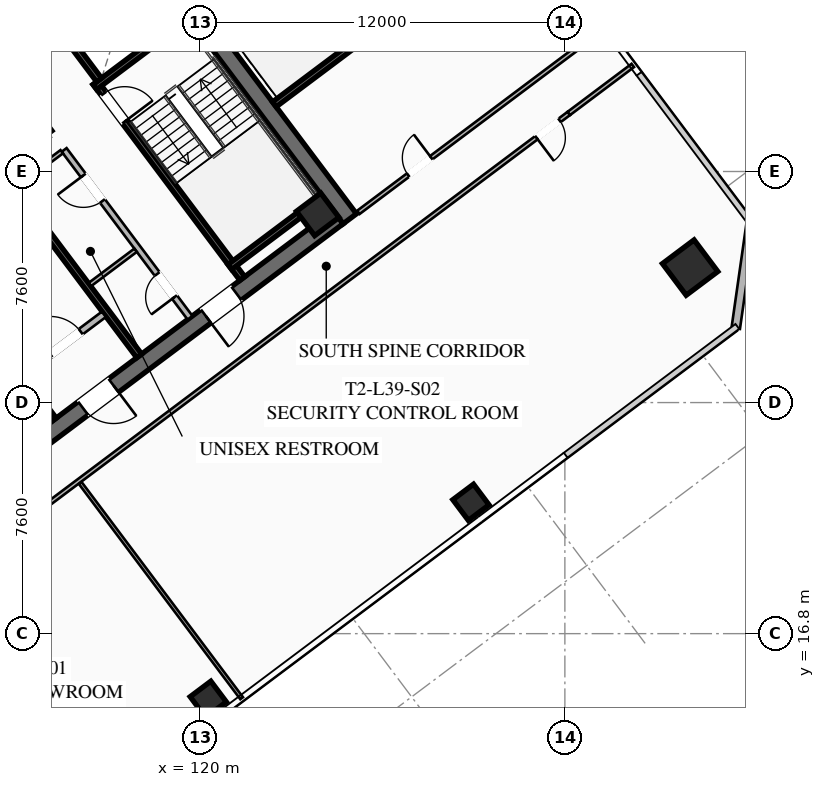
"""IFC4 building model, lengths in metres.
Left out: names, types, materials, properties, quantities, classifications, styles, units other than length and angle.
Written with IfcOpenShell. Run it as: python <this file> out.ifc"""

import sys

from ifc_helpers import new_model, si_unit, direction, frame, frame_2d, origin, origin_2d, place, context, subcontext, project, spatial, rectangle, hollow_rectangle, extrude, element, fill, save


model = new_model("IFC4")
c1 = context("Model", 3, precision=1e-05, world=origin(), true_north=direction((0.0, 1.0)))
c2 = subcontext(c1, "Body", "Model", "MODEL_VIEW")
j1 = project(units=[si_unit("LENGTHUNIT", "METRE"), si_unit("PLANEANGLEUNIT", "RADIAN")], contexts=[c1])
p1 = place(None, origin())
s1 = spatial("IfcSite", under=j1, at=p1, CompositionType="ELEMENT")
p2 = place(p1, origin())
s2 = spatial("IfcBuilding", under=s1, at=p2, CompositionType="ELEMENT")
p3 = place(p2, frame((0.0, 0.0, 146.35)))
s3 = spatial("IfcBuildingStorey", under=s2, at=p3, CompositionType="ELEMENT", Elevation=146.35)
p4 = place(p3, frame((115.564, 42.923, 0.0), z_axis=(0.0, 0.0, 1.0), x_axis=(0.600005007985, -0.799996243986, 0.0)))
e1 = element("IfcWall", 1, at=p4, inside=s3, PredefinedType="SHEAR", context=c2, shape_type="SweptSolid", body=[
    extrude(rectangle(XDim=15.6, YDim=0.55, at=frame_2d((7.8, 0.0))), origin(), (0.0, 0.0, 1.0), 3.55),
])
p5 = place(p3, frame((124.539, 30.498, 0.0), z_axis=(0.0, 0.0, 1.0), x_axis=(-0.799998054672, -0.600002593761, 0.0)))
e2 = element("IfcWall", 2, at=p5, inside=s3, PredefinedType="SHEAR", context=c2, shape_type="SweptSolid", body=[
    extrude(rectangle(XDim=15.06, YDim=0.55, at=frame_2d((7.53, 0.0))), origin(), (0.0, 0.0, 1.0), 3.55),
])
p6 = place(p5, frame((9.23, 0.0, 0.0)))
e3 = element("IfcOpeningElement", 3, at=p6, cuts=e2, PredefinedType="OPENING", context=c2, shape_type="SweptSolid", body=[
    extrude(rectangle(XDim=1.25, YDim=2.25, at=frame_2d((0.625, 1.125))), frame((0.0, 0.285, 0.0), z_axis=(0.0, -1.0, 0.0), x_axis=(1.0, 0.0, 0.0)), (0.0, 0.0, 1.0), 0.57),
])
p7 = place(p5, frame((4.18, 0.0, 0.0)))
e4 = element("IfcOpeningElement", 4, at=p7, cuts=e2, PredefinedType="OPENING", context=c2, shape_type="SweptSolid", body=[
    extrude(rectangle(XDim=1.25, YDim=2.25, at=frame_2d((0.625, 1.125))), frame((0.0, 0.285, 0.0), z_axis=(0.0, -1.0, 0.0), x_axis=(1.0, 0.0, 0.0)), (0.0, 0.0, 1.0), 0.57),
])
p8 = place(p3, frame((103.461, 33.502, 0.0), z_axis=(0.0, 0.0, 1.0), x_axis=(0.799998054672, 0.600002593761, 0.0)))
e5 = element("IfcWall", 5, at=p8, inside=s3, PredefinedType="SHEAR", context=c2, shape_type="SweptSolid", body=[
    extrude(rectangle(XDim=15.06, YDim=0.55, at=frame_2d((7.53, 0.0))), origin(), (0.0, 0.0, 1.0), 3.55),
])
p9 = place(p8, frame((4.58, 0.0, 0.0)))
e6 = element("IfcOpeningElement", 6, at=p9, cuts=e5, PredefinedType="OPENING", context=c2, shape_type="SweptSolid", body=[
    extrude(rectangle(XDim=1.25, YDim=2.25, at=frame_2d((0.625, 1.125))), frame((0.0, 0.285, 0.0), z_axis=(0.0, -1.0, 0.0), x_axis=(1.0, 0.0, 0.0)), (0.0, 0.0, 1.0), 0.57),
])
p10 = place(p8, frame((9.63, 0.0, 0.0)))
e7 = element("IfcOpeningElement", 7, at=p10, cuts=e5, PredefinedType="OPENING", context=c2, shape_type="SweptSolid", body=[
    extrude(rectangle(XDim=1.25, YDim=2.25, at=frame_2d((0.625, 1.125))), frame((0.0, 0.285, 0.0), z_axis=(0.0, -1.0, 0.0), x_axis=(1.0, 0.0, 0.0)), (0.0, 0.0, 1.0), 0.57),
])
p11 = place(p3, frame((123.87, 30.59, 0.0), z_axis=(0.0, 0.0, 1.0), x_axis=(0.799999996291, 0.600000004945, 0.0)))
e8 = element("IfcColumn", 8, at=p11, inside=s3, PredefinedType="COLUMN", context=c2, shape_type="SweptSolid", body=[
    extrude(hollow_rectangle(XDim=1.0, YDim=1.0, WallThickness=0.04, at=origin_2d()), origin(), (0.0, 0.0, 1.0), 3.37),
])
p12 = place(p3, frame((136.12, 28.84, 0.0), z_axis=(0.0, 0.0, 1.0), x_axis=(0.799999996291, 0.600000004945, 0.0)))
e9 = element("IfcColumn", 9, at=p12, inside=s3, PredefinedType="COLUMN", context=c2, shape_type="SweptSolid", body=[
    extrude(hollow_rectangle(XDim=1.3, YDim=1.3, WallThickness=0.05, at=origin_2d()), origin(), (0.0, 0.0, 1.0), 3.37),
])
for number, where, z_axis, x_axis in (
    (10, (120.27, 14.64, 0.0), (0.0, 0.0, 1.0), (0.8, 0.6, 0.0)),
    (11, (128.91, 21.12, 0.0), (0.0, 0.0, 1.0), (0.8, 0.6, 0.0)),
):
    element("IfcColumn", number, at=place(p3, frame(where, z_axis=z_axis, x_axis=x_axis)), inside=s3, PredefinedType="COLUMN", context=c2, shape_type="SweptSolid", body=[
        extrude(hollow_rectangle(XDim=0.85, YDim=0.85, WallThickness=0.035, at=origin_2d()), origin(), (0.0, 0.0, 1.0), 3.37),
    ])
p13 = place(p3, frame((138.12, 30.34, 0.0), z_axis=(0.0, 0.0, 1.0), x_axis=(-0.141421356237, -0.989949493661, 0.0)))
e12 = element("IfcWall", 12, at=p13, inside=s3, PredefinedType="SOLIDWALL", context=c2, shape_type="SweptSolid", body=[
    extrude(rectangle(XDim=3.536, YDim=0.28, at=frame_2d((1.768, 0.0))), origin(), (0.0, 0.0, 1.0), 3.37),
])
p14 = place(p3, frame((116.56, 34.92, 0.0), z_axis=(0.0, 0.0, 1.0), x_axis=(0.59999029481, -0.8000072788, 0.0)))
e13 = element("IfcWall", 13, at=p14, inside=s3, PredefinedType="SHEAR", context=c2, shape_type="SweptSolid", body=[
    extrude(rectangle(XDim=8.05, YDim=0.2, at=frame_2d((4.025, 0.0))), origin(), (0.0, 0.0, 1.0), 3.37),
])
p15 = place(p14, frame((0.45, 0.0, 0.0)))
e14 = element("IfcOpeningElement", 14, at=p15, cuts=e13, PredefinedType="OPENING", context=c2, shape_type="SweptSolid", body=[
    extrude(rectangle(XDim=1.15, YDim=2.2, at=frame_2d((0.575, 1.1))), frame((0.0, 0.11, 0.0), z_axis=(0.0, -1.0, 0.0), x_axis=(1.0, 0.0, 0.0)), (0.0, 0.0, 1.0), 0.22),
])
for number, where, z_axis, x_axis in (
    (15, (116.54, 34.78, 0.0), (0.0, 0.0, 1.0), (0.8, 0.6, 0.0)),
    (16, (120.98, 28.86, 0.0), (0.0, 0.0, 1.0), (0.8, 0.6, 0.0)),
):
    element("IfcWall", number, at=place(p3, frame(where, z_axis=z_axis, x_axis=x_axis)), inside=s3, PredefinedType="SHEAR", context=c2, shape_type="SweptSolid", body=[
        extrude(rectangle(XDim=3.83, YDim=0.2, at=frame_2d((1.915, 0.0))), origin(), (0.0, 0.0, 1.0), 3.37),
    ])
p16 = place(p3, frame((117.998, 25.936, 0.0), z_axis=(0.0, 0.0, 1.0), x_axis=(-0.600002693989, 0.799997979501, 0.0)))
e17 = element("IfcWall", 17, at=p16, inside=s3, PredefinedType="SHEAR", context=c2, shape_type="SweptSolid", body=[
    extrude(rectangle(XDim=14.5, YDim=0.2, at=frame_2d((7.25, 0.0))), origin(), (0.0, 0.0, 1.0), 3.37),
])
p17 = place(p3, frame((114.316, 25.412, 0.0), z_axis=(0.0, 0.0, 1.0), x_axis=(0.800018601094, 0.59997519774, 0.0)))
e18 = element("IfcWall", 18, at=p17, inside=s3, PredefinedType="SOLIDWALL", context=c2, shape_type="SweptSolid", body=[
    extrude(rectangle(XDim=3.15, YDim=0.22, at=frame_2d((1.575, 0.0))), origin(), (0.0, 0.0, 1.0), 2.723),
])
p18 = place(p17, frame((0.95, 0.0, 0.0)))
e19 = element("IfcOpeningElement", 19, at=p18, cuts=e18, PredefinedType="OPENING", context=c2, shape_type="SweptSolid", body=[
    extrude(rectangle(XDim=1.25, YDim=2.25, at=frame_2d((0.625, 1.125))), frame((0.0, 0.12, 0.0), z_axis=(0.0, -1.0, 0.0), x_axis=(1.0, 0.0, 0.0)), (0.0, 0.0, 1.0), 0.24),
])
p19 = place(p3, frame((115.19, 23.83, 0.0), z_axis=(0.0, 0.0, 1.0), x_axis=(-0.599993943644, 0.800004542231, 0.0)))
e20 = element("IfcWall", 20, at=p19, inside=s3, PredefinedType="SHEAR", context=c2, shape_type="SweptSolid", body=[
    extrude(rectangle(XDim=6.45, YDim=0.2, at=frame_2d((3.225, 0.0))), origin(), (0.0, 0.0, 1.0), 3.37),
])
p20 = place(p19, frame((4.875, 0.0, 0.0)))
e21 = element("IfcOpeningElement", 21, at=p20, cuts=e20, PredefinedType="OPENING", context=c2, shape_type="SweptSolid", body=[
    extrude(rectangle(XDim=1.3, YDim=2.25, at=frame_2d((0.65, 1.125))), frame((0.0, 0.11, 0.0), z_axis=(0.0, -1.0, 0.0), x_axis=(1.0, 0.0, 0.0)), (0.0, 0.0, 1.0), 0.22),
])
p21 = place(p19, frame((2.875, 0.0, 0.0)))
e22 = element("IfcOpeningElement", 22, at=p21, cuts=e20, PredefinedType="OPENING", context=c2, shape_type="SweptSolid", body=[
    extrude(rectangle(XDim=1.3, YDim=2.25, at=frame_2d((0.65, 1.125))), frame((0.0, 0.11, 0.0), z_axis=(0.0, -1.0, 0.0), x_axis=(1.0, 0.0, 0.0)), (0.0, 0.0, 1.0), 0.22),
])
p22 = place(p19, frame((0.675, 0.0, 0.0)))
e23 = element("IfcOpeningElement", 23, at=p22, cuts=e20, PredefinedType="OPENING", context=c2, shape_type="SweptSolid", body=[
    extrude(rectangle(XDim=1.3, YDim=2.25, at=frame_2d((0.65, 1.125))), frame((0.0, 0.11, 0.0), z_axis=(0.0, -1.0, 0.0), x_axis=(1.0, 0.0, 0.0)), (0.0, 0.0, 1.0), 0.22),
])
p23 = place(p3, frame((112.81, 40.17, 0.0), z_axis=(0.0, 0.0, 1.0), x_axis=(0.599993943644, -0.800004542231, 0.0)))
e24 = element("IfcWall", 24, at=p23, inside=s3, PredefinedType="SHEAR", context=c2, shape_type="SweptSolid", body=[
    extrude(rectangle(XDim=6.45, YDim=0.2, at=frame_2d((3.225, 0.0))), origin(), (0.0, 0.0, 1.0), 3.37),
])
p24 = place(p3, frame((119.67, 27.19, 0.0), z_axis=(0.0, 0.0, 1.0), x_axis=(-0.599988677396, 0.800008491828, 0.0)))
e25 = element("IfcWall", 25, at=p24, inside=s3, PredefinedType="SOLIDWALL", context=c2, shape_type="SweptSolid", body=[
    extrude(rectangle(XDim=6.9, YDim=0.2, at=frame_2d((3.45, 0.0))), origin(), (0.0, 0.0, 1.0), 2.723),
])
p25 = place(p24, frame((0.85, 0.0, 0.0)))
e26 = element("IfcOpeningElement", 26, at=p25, cuts=e25, PredefinedType="OPENING", context=c2, shape_type="SweptSolid", body=[
    extrude(rectangle(XDim=0.95, YDim=2.05, at=frame_2d((0.475, 1.025))), frame((0.0, 0.11, 0.0), z_axis=(0.0, -1.0, 0.0), x_axis=(1.0, 0.0, 0.0)), (0.0, 0.0, 1.0), 0.22),
])
p26 = place(p24, frame((4.8, 0.0, 0.0)))
e27 = element("IfcOpeningElement", 27, at=p26, cuts=e25, PredefinedType="OPENING", context=c2, shape_type="SweptSolid", body=[
    extrude(rectangle(XDim=1.05, YDim=2.2, at=frame_2d((0.525, 1.1))), frame((0.0, 0.11, 0.0), z_axis=(0.0, -1.0, 0.0), x_axis=(1.0, 0.0, 0.0)), (0.0, 0.0, 1.0), 0.22),
])
for number, where, z_axis, x_axis in (
    (28, (113.946, 31.522, 0.0), (0.0, 0.0, 1.0), (0.8, 0.6, 0.0)),
    (29, (116.376, 28.282, 0.0), (0.0, 0.0, 1.0), (0.8, 0.6, 0.0)),
):
    element("IfcWall", number, at=place(p3, frame(where, z_axis=z_axis, x_axis=x_axis)), inside=s3, PredefinedType="PARTITIONING", context=c2, shape_type="SweptSolid", body=[
        extrude(rectangle(XDim=1.88, YDim=0.135, at=frame_2d((0.94, 0.0))), origin(), (0.0, 0.0, 1.0), 2.723),
    ])
p27 = place(p3, frame((115.11, 33.27, 0.0), z_axis=(0.0, 0.0, 1.0), x_axis=(-0.600011322243, 0.799991508192, 0.0)))
e30 = element("IfcWall", 30, at=p27, inside=s3, PredefinedType="SOLIDWALL", context=c2, shape_type="SweptSolid", body=[
    extrude(rectangle(XDim=6.9, YDim=0.2, at=frame_2d((3.45, 0.0))), origin(), (0.0, 0.0, 1.0), 3.37),
])
p28 = place(p27, frame((0.575, 0.0, 0.0)))
e31 = element("IfcOpeningElement", 31, at=p28, cuts=e30, PredefinedType="OPENING", context=c2, shape_type="SweptSolid", body=[
    extrude(rectangle(XDim=1.1, YDim=2.2, at=frame_2d((0.55, 1.1))), frame((0.0, 0.11, 0.0), z_axis=(0.0, -1.0, 0.0), x_axis=(1.0, 0.0, 0.0)), (0.0, 0.0, 1.0), 0.22),
])
p29 = place(p27, frame((2.825, 0.0, 0.0)))
e32 = element("IfcOpeningElement", 32, at=p29, cuts=e30, PredefinedType="OPENING", context=c2, shape_type="SweptSolid", body=[
    extrude(rectangle(XDim=1.1, YDim=2.2, at=frame_2d((0.55, 1.1))), frame((0.0, 0.11, 0.0), z_axis=(0.0, -1.0, 0.0), x_axis=(1.0, 0.0, 0.0)), (0.0, 0.0, 1.0), 0.22),
])
p30 = place(p27, frame((5.075, 0.0, 0.0)))
e33 = element("IfcOpeningElement", 33, at=p30, cuts=e30, PredefinedType="OPENING", context=c2, shape_type="SweptSolid", body=[
    extrude(rectangle(XDim=1.1, YDim=2.2, at=frame_2d((0.55, 1.1))), frame((0.0, 0.11, 0.0), z_axis=(0.0, -1.0, 0.0), x_axis=(1.0, 0.0, 0.0)), (0.0, 0.0, 1.0), 0.22),
])
p31 = place(p3, frame((122.444, 34.208, 0.0), z_axis=(0.0, 0.0, 1.0), x_axis=(0.79999138319, 0.600011488909, 0.0)))
e34 = element("IfcWall", 34, at=p31, inside=s3, PredefinedType="SHEAR", context=c2, shape_type="SweptSolid", body=[
    extrude(rectangle(XDim=3.4, YDim=0.2, at=frame_2d((1.7, 0.0))), origin(), (0.0, 0.0, 1.0), 3.37),
])
p32 = place(p3, frame((94.778, 31.546, 0.0), z_axis=(0.0, 0.0, 1.0), x_axis=(0.8, 0.6, 0.0)))
e35 = element("IfcWall", 35, at=p32, inside=s3, PredefinedType="PARTITIONING", context=c2, shape_type="SweptSolid", body=[
    extrude(rectangle(XDim=31.3, YDim=0.135, at=frame_2d((15.65, 0.0))), origin(), (0.0, 0.0, 1.0), 2.723),
])
p33 = place(p32, frame((0.3, 0.0, 0.0)))
e36 = element("IfcOpeningElement", 36, at=p33, cuts=e35, PredefinedType="OPENING", context=c2, shape_type="SweptSolid", body=[
    extrude(rectangle(XDim=0.95, YDim=2.05, at=frame_2d((0.475, 1.025))), frame((0.0, 0.077, 0.0), z_axis=(0.0, -1.0, 0.0), x_axis=(1.0, 0.0, 0.0)), (0.0, 0.0, 1.0), 0.155),
])
p34 = place(p32, frame((11.21, 0.0, 0.0)))
e37 = element("IfcOpeningElement", 37, at=p34, cuts=e35, PredefinedType="OPENING", context=c2, shape_type="SweptSolid", body=[
    extrude(rectangle(XDim=0.95, YDim=2.05, at=frame_2d((0.475, 1.025))), frame((0.0, 0.077, 0.0), z_axis=(0.0, -1.0, 0.0), x_axis=(1.0, 0.0, 0.0)), (0.0, 0.0, 1.0), 0.155),
])
p35 = place(p32, frame((15.487, 0.0, 0.0)))
e38 = element("IfcOpeningElement", 38, at=p35, cuts=e35, PredefinedType="OPENING", context=c2, shape_type="SweptSolid", body=[
    extrude(rectangle(XDim=0.95, YDim=2.05, at=frame_2d((0.475, 1.025))), frame((0.0, 0.077, 0.0), z_axis=(0.0, -1.0, 0.0), x_axis=(1.0, 0.0, 0.0)), (0.0, 0.0, 1.0), 0.155),
])
p36 = place(p32, frame((30.05, 0.0, 0.0)))
e39 = element("IfcOpeningElement", 39, at=p36, cuts=e35, PredefinedType="OPENING", context=c2, shape_type="SweptSolid", body=[
    extrude(rectangle(XDim=0.95, YDim=2.05, at=frame_2d((0.475, 1.025))), frame((0.0, 0.077, 0.0), z_axis=(0.0, -1.0, 0.0), x_axis=(1.0, 0.0, 0.0)), (0.0, 0.0, 1.0), 0.155),
])
p37 = place(p3, frame((132.13, 33.91, 0.0), z_axis=(0.0, 0.0, 1.0), x_axis=(-0.799997191971, -0.600003744021, 0.0)))
e40 = element("IfcWall", 40, at=p37, inside=s3, PredefinedType="PARTITIONING", context=c2, shape_type="SweptSolid", body=[
    extrude(rectangle(XDim=31.3, YDim=0.135, at=frame_2d((15.65, 0.0))), origin(), (0.0, 0.0, 1.0), 2.723),
])
p38 = place(p37, frame((29.97, 0.0, 0.0)))
e41 = element("IfcOpeningElement", 41, at=p38, cuts=e40, PredefinedType="OPENING", context=c2, shape_type="SweptSolid", body=[
    extrude(rectangle(XDim=0.95, YDim=2.05, at=frame_2d((0.475, 1.025))), frame((0.0, 0.077, 0.0), z_axis=(0.0, -1.0, 0.0), x_axis=(1.0, 0.0, 0.0)), (0.0, 0.0, 1.0), 0.155),
])
p39 = place(p37, frame((0.38, 0.0, 0.0)))
e42 = element("IfcOpeningElement", 42, at=p39, cuts=e40, PredefinedType="OPENING", context=c2, shape_type="SweptSolid", body=[
    extrude(rectangle(XDim=0.95, YDim=2.05, at=frame_2d((0.475, 1.025))), frame((0.0, 0.077, 0.0), z_axis=(0.0, -1.0, 0.0), x_axis=(1.0, 0.0, 0.0)), (0.0, 0.0, 1.0), 0.155),
])
p40 = place(p3, frame((132.13, 33.91, 0.0), z_axis=(0.0, 0.0, 1.0), x_axis=(0.799977721118, 0.600029704027, 0.0)))
e43 = element("IfcWall", 43, at=p40, inside=s3, PredefinedType="PARTITIONING", context=c2, shape_type="SweptSolid", body=[
    extrude(rectangle(XDim=2.63, YDim=0.135, at=frame_2d((1.315, 0.0))), origin(), (0.0, 0.0, 1.0), 2.723),
])
p41 = place(p3, frame((121.368, 14.676, 0.0), z_axis=(0.0, 0.0, 1.0), x_axis=(-0.599982344389, 0.800013241404, 0.0)))
e44 = element("IfcWall", 44, at=p41, inside=s3, PredefinedType="PARTITIONING", context=c2, shape_type="SweptSolid", body=[
    extrude(rectangle(XDim=8.85, YDim=0.11, at=frame_2d((4.425, 0.0))), origin(), (0.0, 0.0, 1.0), 2.723),
])
p42 = place(p3, frame((125.208, 30.656, 0.0), z_axis=(0.0, 0.0, 1.0), x_axis=(0.800005876956, 0.599992163979, 0.0)))
e45 = element("IfcWall", 45, at=p42, inside=s3, PredefinedType="PARTITIONING", context=c2, shape_type="SweptSolid", body=[
    extrude(rectangle(XDim=9.97, YDim=0.135, at=frame_2d((4.985, 0.0))), origin(), (0.0, 0.0, 1.0), 2.723),
])
p43 = place(p42, frame((2.045, 0.0, 0.0)))
e46 = element("IfcOpeningElement", 46, at=p43, cuts=e45, PredefinedType="OPENING", context=c2, shape_type="SweptSolid", body=[
    extrude(rectangle(XDim=0.95, YDim=2.05, at=frame_2d((0.475, 1.025))), frame((0.0, 0.077, 0.0), z_axis=(0.0, -1.0, 0.0), x_axis=(1.0, 0.0, 0.0)), (0.0, 0.0, 1.0), 0.155),
])
p44 = place(p6, origin())
e47 = element("IfcDoor", 47, at=p44, inside=s3, OperationType="SINGLE_SWING_LEFT", PredefinedType="DOOR", context=c2, shape_type="SweptSolid", body=[
    extrude(rectangle(XDim=1.25, YDim=2.25, at=frame_2d((0.625, 1.125))), frame((0.0, 0.025, 0.0), z_axis=(0.0, -1.0, 0.0), x_axis=(1.0, 0.0, 0.0)), (0.0, 0.0, 1.0), 0.05),
])
fill(e3, e47)
p45 = place(p7, origin())
e48 = element("IfcDoor", 48, at=p45, inside=s3, OperationType="SINGLE_SWING_RIGHT", PredefinedType="DOOR", context=c2, shape_type="SweptSolid", body=[
    extrude(rectangle(XDim=1.25, YDim=2.25, at=frame_2d((0.625, 1.125))), frame((0.0, 0.025, 0.0), z_axis=(0.0, -1.0, 0.0), x_axis=(1.0, 0.0, 0.0)), (0.0, 0.0, 1.0), 0.05),
])
fill(e4, e48)
p46 = place(p15, origin())
e49 = element("IfcDoor", 49, at=p46, inside=s3, OperationType="SINGLE_SWING_RIGHT", PredefinedType="DOOR", context=c2, shape_type="SweptSolid", body=[
    extrude(rectangle(XDim=1.15, YDim=2.2, at=frame_2d((0.575, 1.1))), frame((0.0, 0.025, 0.0), z_axis=(0.0, -1.0, 0.0), x_axis=(1.0, 0.0, 0.0)), (0.0, 0.0, 1.0), 0.05),
])
fill(e14, e49)
p47 = place(p18, origin())
e50 = element("IfcDoor", 50, at=p47, inside=s3, OperationType="SINGLE_SWING_LEFT", PredefinedType="DOOR", context=c2, shape_type="SweptSolid", body=[
    extrude(rectangle(XDim=1.25, YDim=2.25, at=frame_2d((0.625, 1.125))), frame((0.0, 0.025, 0.0), z_axis=(0.0, -1.0, 0.0), x_axis=(1.0, 0.0, 0.0)), (0.0, 0.0, 1.0), 0.05),
])
fill(e19, e50)
p48 = place(p25, origin())
e51 = element("IfcDoor", 51, at=p48, inside=s3, OperationType="SINGLE_SWING_LEFT", PredefinedType="DOOR", context=c2, shape_type="SweptSolid", body=[
    extrude(rectangle(XDim=0.95, YDim=2.05, at=frame_2d((0.475, 1.025))), frame((0.0, 0.025, 0.0), z_axis=(0.0, -1.0, 0.0), x_axis=(1.0, 0.0, 0.0)), (0.0, 0.0, 1.0), 0.05),
])
fill(e26, e51)
p49 = place(p26, origin())
e52 = element("IfcDoor", 52, at=p49, inside=s3, OperationType="SINGLE_SWING_RIGHT", PredefinedType="DOOR", context=c2, shape_type="SweptSolid", body=[
    extrude(rectangle(XDim=1.05, YDim=2.2, at=frame_2d((0.525, 1.1))), frame((0.0, 0.025, 0.0), z_axis=(0.0, -1.0, 0.0), x_axis=(1.0, 0.0, 0.0)), (0.0, 0.0, 1.0), 0.05),
])
fill(e27, e52)
p50 = place(p39, origin())
e53 = element("IfcDoor", 53, at=p50, inside=s3, OperationType="SINGLE_SWING_RIGHT", PredefinedType="DOOR", context=c2, shape_type="SweptSolid", body=[
    extrude(rectangle(XDim=0.95, YDim=2.05, at=frame_2d((0.475, 1.025))), frame((0.0, 0.025, 0.0), z_axis=(0.0, -1.0, 0.0), x_axis=(1.0, 0.0, 0.0)), (0.0, 0.0, 1.0), 0.05),
])
fill(e42, e53)
p51 = place(p43, origin())
e54 = element("IfcDoor", 54, at=p51, inside=s3, OperationType="SINGLE_SWING_RIGHT", PredefinedType="DOOR", context=c2, shape_type="SweptSolid", body=[
    extrude(rectangle(XDim=0.95, YDim=2.05, at=frame_2d((0.475, 1.025))), frame((0.0, 0.025, 0.0), z_axis=(0.0, -1.0, 0.0), x_axis=(1.0, 0.0, 0.0)), (0.0, 0.0, 1.0), 0.05),
])
fill(e46, e54)
save(model, sys.argv[1])
